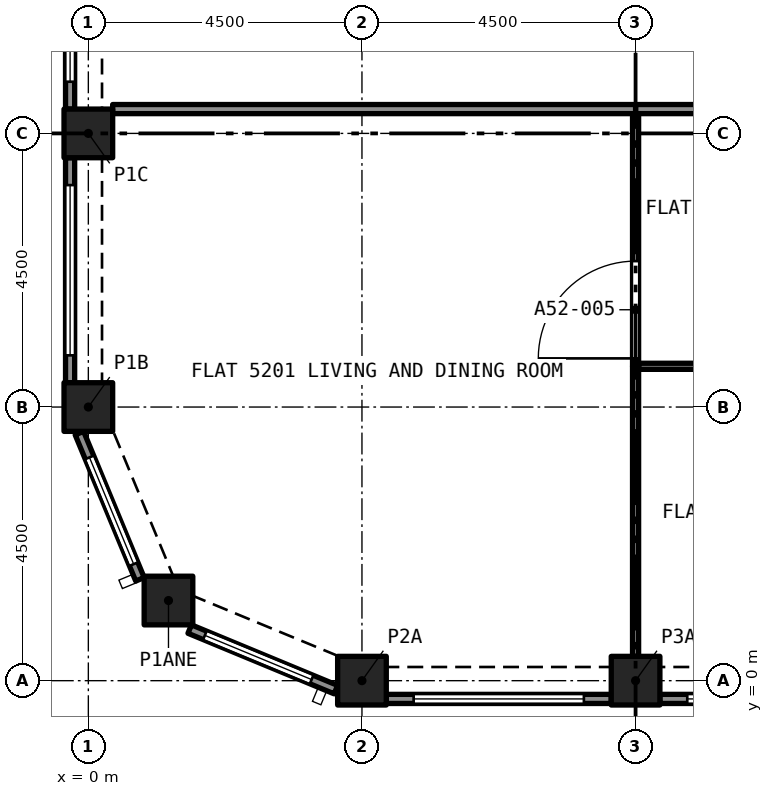
"""IFC4 building model, lengths in metres.
Left out: names, types, materials, properties, quantities, classifications, styles, units other than length and angle.
Written with IfcOpenShell. Run it as: python <this file> out.ifc"""

import sys

from ifc_helpers import new_model, si_unit, direction, frame, frame_2d, origin, origin_2d, place, context, subcontext, project, spatial, rectangle, extrude, element, fill, save


model = new_model("IFC4")
c1 = context("Model", 3, precision=1e-05, world=origin(), true_north=direction((0.0, 1.0)))
c2 = subcontext(c1, "Body", "Model", "MODEL_VIEW")
j1 = project(units=[si_unit("LENGTHUNIT", "METRE"), si_unit("PLANEANGLEUNIT", "RADIAN")], contexts=[c1])
p1 = place(None, origin())
s1 = spatial("IfcSite", under=j1, at=p1, CompositionType="ELEMENT")
p2 = place(p1, origin())
s2 = spatial("IfcBuilding", under=s1, at=p2, CompositionType="ELEMENT")
p3 = place(p2, frame((0.0, 0.0, 189.1)))
s3 = spatial("IfcBuildingStorey", under=s2, at=p3, CompositionType="ELEMENT", Elevation=189.1)
for number, where, z_axis, x_axis in (
    (1, (4.5, 0.0, 0.0), (0.0, 0.0, 1.0), (1.0, 0.0, 0.0)),
    (2, (9.0, 0.0, 0.0), (0.0, 0.0, 1.0), (1.0, 0.0, 0.0)),
    (3, (1.318, 1.318, 0.0), (0.0, 0.0, 1.0), (1.0, 0.0, 0.0)),
    (4, (0.0, 4.5, 0.0), (0.0, 0.0, 1.0), (1.0, 0.0, 0.0)),
    (5, (0.0, 9.0, 0.0), (0.0, 0.0, 1.0), (1.0, 0.0, 0.0)),
):
    element("IfcColumn", number, at=place(p3, frame(where, z_axis=z_axis, x_axis=x_axis)), inside=s3, PredefinedType="COLUMN", context=c2, shape_type="SweptSolid", body=[
        extrude(rectangle(XDim=0.8, YDim=0.8, at=origin_2d()), origin(), (0.0, 0.0, 1.0), 3.2),
    ])
p4 = place(p3, frame((-0.3, 9.4, 0.0), z_axis=(0.0, 0.0, 1.0), x_axis=(0.0, 1.0, 0.0)))
e6 = element("IfcWall", 6, at=p4, inside=s3, PredefinedType="SOLIDWALL", context=c2, shape_type="SweptSolid", body=[
    extrude(rectangle(XDim=3.7, YDim=0.15, at=frame_2d((1.85, 0.0))), origin(), (0.0, 0.0, 1.0), 3.2),
])
p5 = place(p4, frame((0.45, 0.0, 0.45)))
e7 = element("IfcOpeningElement", 7, at=p5, cuts=e6, PredefinedType="OPENING", context=c2, shape_type="SweptSolid", body=[
    extrude(rectangle(XDim=2.8, YDim=1.95, at=frame_2d((1.4, 0.975))), frame((0.0, 0.085, 0.0), z_axis=(0.0, -1.0, 0.0), x_axis=(1.0, 0.0, 0.0)), (0.0, 0.0, 1.0), 0.17),
])
p6 = place(p3, frame((-0.3, 4.9, 0.0), z_axis=(0.0, 0.0, 1.0), x_axis=(0.0, 1.0, 0.0)))
e8 = element("IfcWall", 8, at=p6, inside=s3, PredefinedType="SOLIDWALL", context=c2, shape_type="SweptSolid", body=[
    extrude(rectangle(XDim=3.7, YDim=0.15, at=frame_2d((1.85, 0.0))), origin(), (0.0, 0.0, 1.0), 3.2),
])
p7 = place(p6, frame((0.45, 0.0, 0.45)))
e9 = element("IfcOpeningElement", 9, at=p7, cuts=e8, PredefinedType="OPENING", context=c2, shape_type="SweptSolid", body=[
    extrude(rectangle(XDim=2.8, YDim=1.95, at=frame_2d((1.4, 0.975))), frame((0.0, 0.085, 0.0), z_axis=(0.0, -1.0, 0.0), x_axis=(1.0, 0.0, 0.0)), (0.0, 0.0, 1.0), 0.17),
])
p8 = place(p3, frame((0.849, 1.667, 0.0), z_axis=(0.0, 0.0, 1.0), x_axis=(-0.382669406082, 0.923885342263, 0.0)))
e10 = element("IfcWall", 10, at=p8, inside=s3, PredefinedType="SOLIDWALL", context=c2, shape_type="SweptSolid", body=[
    extrude(rectangle(XDim=2.602, YDim=0.15, at=frame_2d((1.301, 0.0))), origin(), (0.0, 0.0, 1.0), 3.2),
])
p9 = place(p8, frame((0.27, 0.0, 0.45)))
e11 = element("IfcOpeningElement", 11, at=p9, cuts=e10, PredefinedType="OPENING", context=c2, shape_type="SweptSolid", body=[
    extrude(rectangle(XDim=1.9, YDim=1.95, at=frame_2d((0.95, 0.975))), frame((0.0, 0.085, 0.0), z_axis=(0.0, -1.0, 0.0), x_axis=(1.0, 0.0, 0.0)), (0.0, 0.0, 1.0), 0.17),
])
p10 = place(p3, frame((4.071, -0.147, 0.0), z_axis=(0.0, 0.0, 1.0), x_axis=(-0.923885342263, 0.382669406082, 0.0)))
e12 = element("IfcWall", 12, at=p10, inside=s3, PredefinedType="SOLIDWALL", context=c2, shape_type="SweptSolid", body=[
    extrude(rectangle(XDim=2.602, YDim=0.15, at=frame_2d((1.301, 0.0))), origin(), (0.0, 0.0, 1.0), 3.2),
])
p11 = place(p10, frame((0.432, 0.0, 0.45)))
e13 = element("IfcOpeningElement", 13, at=p11, cuts=e12, PredefinedType="OPENING", context=c2, shape_type="SweptSolid", body=[
    extrude(rectangle(XDim=1.9, YDim=1.95, at=frame_2d((0.95, 0.975))), frame((0.0, 0.085, 0.0), z_axis=(0.0, -1.0, 0.0), x_axis=(1.0, 0.0, 0.0)), (0.0, 0.0, 1.0), 0.17),
])
p12 = place(p3, frame((8.6, -0.3, 0.0), z_axis=(0.0, 0.0, 1.0), x_axis=(-1.0, 0.0, 0.0)))
e14 = element("IfcWall", 14, at=p12, inside=s3, PredefinedType="SOLIDWALL", context=c2, shape_type="SweptSolid", body=[
    extrude(rectangle(XDim=3.7, YDim=0.15, at=frame_2d((1.85, 0.0))), origin(), (0.0, 0.0, 1.0), 3.2),
])
p13 = place(p12, frame((0.45, 0.0, 0.45)))
e15 = element("IfcOpeningElement", 15, at=p13, cuts=e14, PredefinedType="OPENING", context=c2, shape_type="SweptSolid", body=[
    extrude(rectangle(XDim=2.8, YDim=1.95, at=frame_2d((1.4, 0.975))), frame((0.0, 0.085, 0.0), z_axis=(0.0, -1.0, 0.0), x_axis=(1.0, 0.0, 0.0)), (0.0, 0.0, 1.0), 0.17),
])
p14 = place(p3, frame((13.1, -0.3, 0.0), z_axis=(0.0, 0.0, 1.0), x_axis=(-1.0, 0.0, 0.0)))
e16 = element("IfcWall", 16, at=p14, inside=s3, PredefinedType="SOLIDWALL", context=c2, shape_type="SweptSolid", body=[
    extrude(rectangle(XDim=3.7, YDim=0.15, at=frame_2d((1.85, 0.0))), origin(), (0.0, 0.0, 1.0), 3.2),
])
p15 = place(p14, frame((0.45, 0.0, 0.45)))
e17 = element("IfcOpeningElement", 17, at=p15, cuts=e16, PredefinedType="OPENING", context=c2, shape_type="SweptSolid", body=[
    extrude(rectangle(XDim=2.8, YDim=1.95, at=frame_2d((1.4, 0.975))), frame((0.0, 0.085, 0.0), z_axis=(0.0, -1.0, 0.0), x_axis=(1.0, 0.0, 0.0)), (0.0, 0.0, 1.0), 0.17),
])
p16 = place(p3, frame((13.5, 5.17, 0.0), z_axis=(0.0, 0.0, 1.0), x_axis=(-1.0, 0.0, 0.0)))
e18 = element("IfcWall", 18, at=p16, inside=s3, PredefinedType="PARTITIONING", context=c2, shape_type="SweptSolid", body=[
    extrude(rectangle(XDim=4.45, YDim=0.1, at=frame_2d((2.225, 0.0))), origin(), (0.0, 0.0, 1.0), 2.9),
])
p17 = place(p16, frame((1.8, 0.0, 0.0)))
e19 = element("IfcOpeningElement", 19, at=p17, cuts=e18, PredefinedType="OPENING", context=c2, shape_type="SweptSolid", body=[
    extrude(rectangle(XDim=0.9, YDim=2.1, at=frame_2d((0.45, 1.05))), frame((0.0, 0.06, 0.0), z_axis=(0.0, -1.0, 0.0), x_axis=(1.0, 0.0, 0.0)), (0.0, 0.0, 1.0), 0.12),
])
p18 = place(p3, frame((9.0, 0.4, 0.0), z_axis=(0.0, 0.0, 1.0), x_axis=(0.0, 1.0, 0.0)))
e20 = element("IfcWall", 20, at=p18, inside=s3, PredefinedType="PARTITIONING", context=c2, shape_type="SweptSolid", body=[
    extrude(rectangle(XDim=4.77, YDim=0.1, at=frame_2d((2.385, 0.0))), origin(), (0.0, 0.0, 1.0), 2.9),
])
p19 = place(p3, frame((9.0, 5.17, 0.0), z_axis=(0.0, 0.0, 1.0), x_axis=(0.0, 1.0, 0.0)))
e21 = element("IfcWall", 21, at=p19, inside=s3, PredefinedType="PARTITIONING", context=c2, shape_type="SweptSolid", body=[
    extrude(rectangle(XDim=4.155, YDim=0.1, at=frame_2d((2.078, 0.0))), origin(), (0.0, 0.0, 1.0), 2.9),
])
p20 = place(p19, frame((0.13, 0.0, 0.0)))
e22 = element("IfcOpeningElement", 22, at=p20, cuts=e21, PredefinedType="OPENING", context=c2, shape_type="SweptSolid", body=[
    extrude(rectangle(XDim=1.6, YDim=2.1, at=frame_2d((0.8, 1.05))), frame((0.0, 0.06, 0.0), z_axis=(0.0, -1.0, 0.0), x_axis=(1.0, 0.0, 0.0)), (0.0, 0.0, 1.0), 0.12),
])
p21 = place(p3, frame((12.05, 9.4, 0.0), z_axis=(0.0, 0.0, 1.0), x_axis=(-1.0, 0.0, 0.0)))
e23 = element("IfcWall", 23, at=p21, inside=s3, PredefinedType="PARTITIONING", context=c2, shape_type="SweptSolid", body=[
    extrude(rectangle(XDim=3.05, YDim=0.15, at=frame_2d((1.525, 0.0))), origin(), (0.0, 0.0, 1.0), 2.9),
])
p22 = place(p21, frame((0.2, 0.0, 0.0)))
e24 = element("IfcOpeningElement", 24, at=p22, cuts=e23, PredefinedType="OPENING", context=c2, shape_type="SweptSolid", body=[
    extrude(rectangle(XDim=1.2, YDim=2.4, at=frame_2d((0.6, 1.2))), frame((0.0, 0.085, 0.0), z_axis=(0.0, -1.0, 0.0), x_axis=(1.0, 0.0, 0.0)), (0.0, 0.0, 1.0), 0.17),
])
p23 = place(p3, frame((0.4, 9.4, 0.0), z_axis=(0.0, 0.0, 1.0), x_axis=(1.0, 0.0, 0.0)))
e25 = element("IfcWall", 25, at=p23, inside=s3, PredefinedType="PARTITIONING", context=c2, shape_type="SweptSolid", body=[
    extrude(rectangle(XDim=8.6, YDim=0.15, at=frame_2d((4.3, 0.0))), origin(), (0.0, 0.0, 1.0), 2.9),
])
p24 = place(p5, origin())
e26 = element("IfcWindow", 26, at=p24, inside=s3, PartitioningType="SINGLE_PANEL", PredefinedType="WINDOW", context=c2, shape_type="SweptSolid", body=[
    extrude(rectangle(XDim=2.8, YDim=1.95, at=frame_2d((1.4, 0.975))), frame((0.0, 0.03, 0.0), z_axis=(0.0, -1.0, 0.0), x_axis=(1.0, 0.0, 0.0)), (0.0, 0.0, 1.0), 0.06),
])
fill(e7, e26)
p25 = place(p7, origin())
e27 = element("IfcWindow", 27, at=p25, inside=s3, PartitioningType="SINGLE_PANEL", PredefinedType="WINDOW", context=c2, shape_type="SweptSolid", body=[
    extrude(rectangle(XDim=2.8, YDim=1.95, at=frame_2d((1.4, 0.975))), frame((0.0, 0.03, 0.0), z_axis=(0.0, -1.0, 0.0), x_axis=(1.0, 0.0, 0.0)), (0.0, 0.0, 1.0), 0.06),
])
fill(e9, e27)
p26 = place(p9, origin())
e28 = element("IfcWindow", 28, at=p26, inside=s3, PartitioningType="SINGLE_PANEL", PredefinedType="WINDOW", context=c2, shape_type="SweptSolid", body=[
    extrude(rectangle(XDim=1.9, YDim=1.95, at=frame_2d((0.95, 0.975))), frame((0.0, 0.03, 0.0), z_axis=(0.0, -1.0, 0.0), x_axis=(1.0, 0.0, 0.0)), (0.0, 0.0, 1.0), 0.06),
])
fill(e11, e28)
p27 = place(p11, origin())
e29 = element("IfcWindow", 29, at=p27, inside=s3, PartitioningType="SINGLE_PANEL", PredefinedType="WINDOW", context=c2, shape_type="SweptSolid", body=[
    extrude(rectangle(XDim=1.9, YDim=1.95, at=frame_2d((0.95, 0.975))), frame((0.0, 0.03, 0.0), z_axis=(0.0, -1.0, 0.0), x_axis=(1.0, 0.0, 0.0)), (0.0, 0.0, 1.0), 0.06),
])
fill(e13, e29)
p28 = place(p13, origin())
e30 = element("IfcWindow", 30, at=p28, inside=s3, PartitioningType="SINGLE_PANEL", PredefinedType="WINDOW", context=c2, shape_type="SweptSolid", body=[
    extrude(rectangle(XDim=2.8, YDim=1.95, at=frame_2d((1.4, 0.975))), frame((0.0, 0.03, 0.0), z_axis=(0.0, -1.0, 0.0), x_axis=(1.0, 0.0, 0.0)), (0.0, 0.0, 1.0), 0.06),
])
fill(e15, e30)
p29 = place(p15, origin())
e31 = element("IfcWindow", 31, at=p29, inside=s3, PartitioningType="SINGLE_PANEL", PredefinedType="WINDOW", context=c2, shape_type="SweptSolid", body=[
    extrude(rectangle(XDim=2.8, YDim=1.95, at=frame_2d((1.4, 0.975))), frame((0.0, 0.03, 0.0), z_axis=(0.0, -1.0, 0.0), x_axis=(1.0, 0.0, 0.0)), (0.0, 0.0, 1.0), 0.06),
])
fill(e17, e31)
p30 = place(p20, origin())
e32 = element("IfcDoor", 32, at=p30, inside=s3, OperationType="SINGLE_SWING_LEFT", PredefinedType="DOOR", context=c2, shape_type="SweptSolid", body=[
    extrude(rectangle(XDim=1.6, YDim=2.1, at=frame_2d((0.8, 1.05))), frame((0.0, 0.025, 0.0), z_axis=(0.0, -1.0, 0.0), x_axis=(1.0, 0.0, 0.0)), (0.0, 0.0, 1.0), 0.05),
])
fill(e22, e32)
save(model, sys.argv[1])
